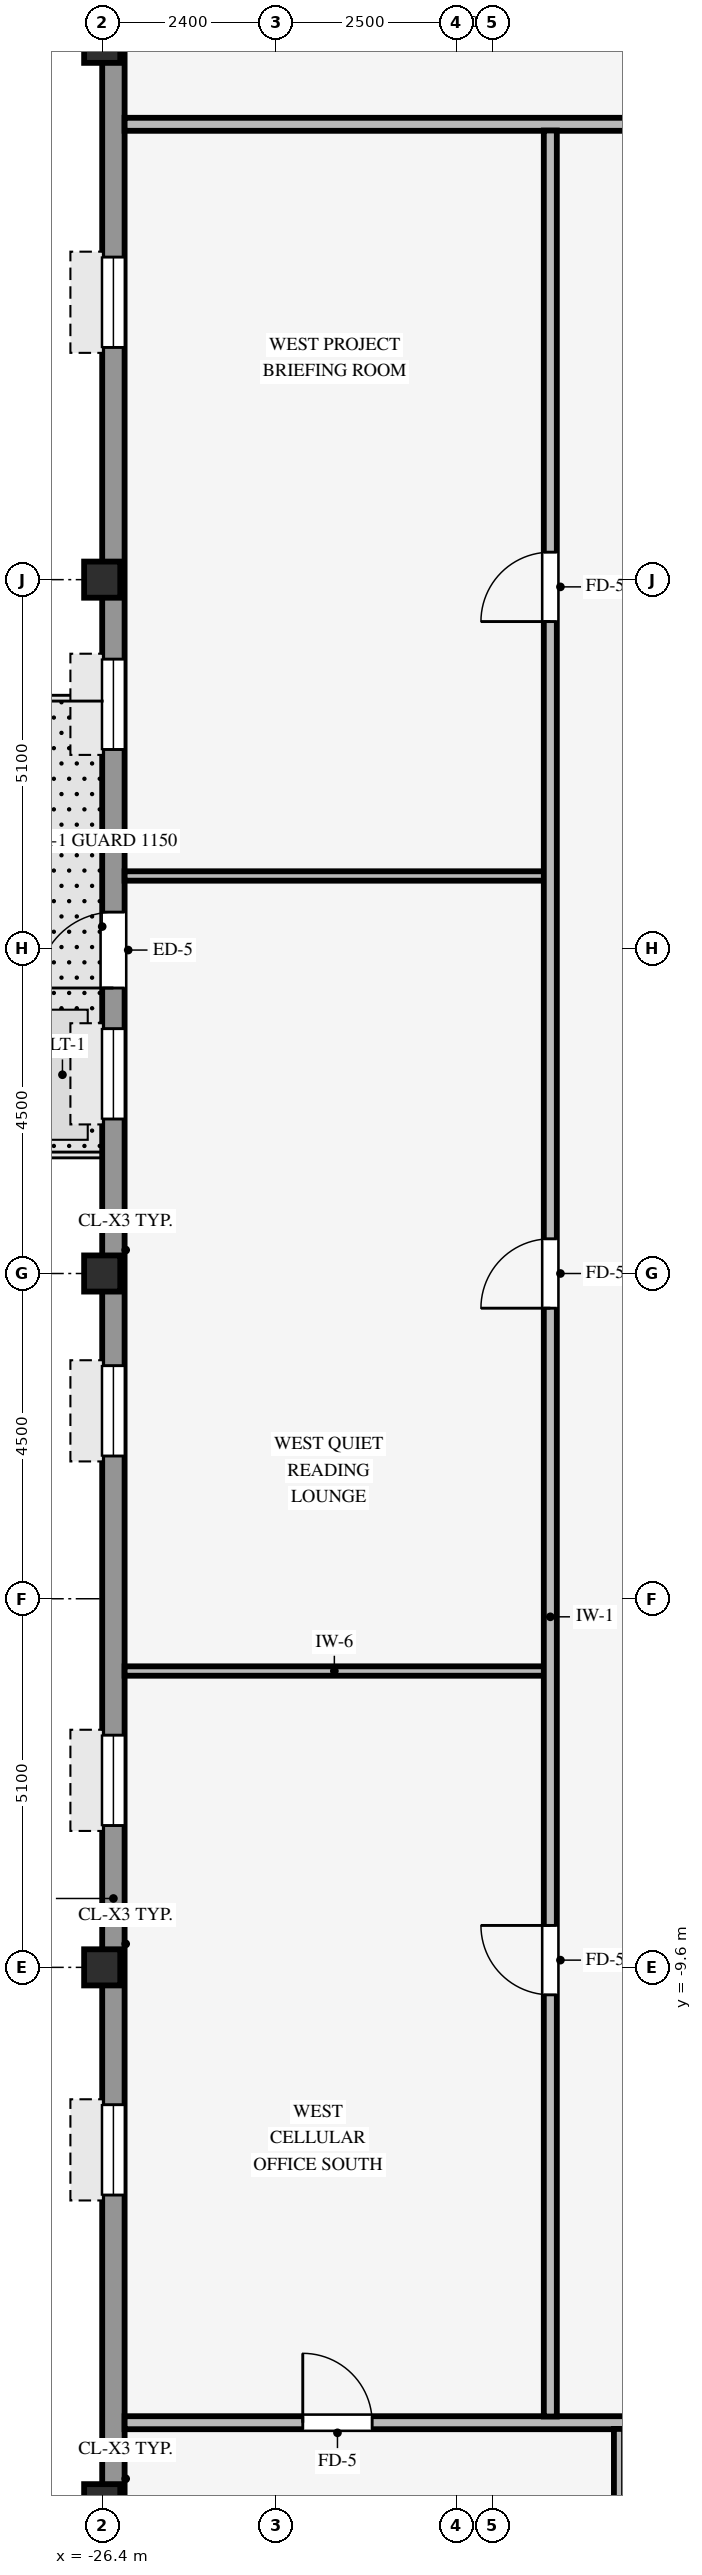
"""IFC4 building model, lengths in metres.
Left out: names, types, materials, properties, quantities, classifications, styles, units other than length and angle.
Written with IfcOpenShell. Run it as: python <this file> out.ifc"""

import sys

from ifc_helpers import new_model, si_unit, direction, frame, frame_2d, origin, origin_2d, place, context, subcontext, project, spatial, rectangle, hollow_rectangle, extrude, source, transform, mapped, element, fill, save


model = new_model("IFC4")
c1 = context("Model", 3, precision=1e-05, world=origin(), true_north=direction((0.0, 1.0)))
c2 = subcontext(c1, "Body", "Model", "MODEL_VIEW")
j1 = project(units=[si_unit("LENGTHUNIT", "METRE"), si_unit("PLANEANGLEUNIT", "RADIAN")], contexts=[c1])
p1 = place(None, origin())
s1 = spatial("IfcSite", under=j1, at=p1, CompositionType="ELEMENT")
p2 = place(p1, origin())
s2 = spatial("IfcBuilding", under=s1, at=p2, CompositionType="ELEMENT")
p3 = place(p2, frame((0.0, 0.0, 194.55)))
s3 = spatial("IfcBuildingStorey", under=s2, at=p3, CompositionType="ELEMENT", Elevation=194.55)
for number, where, z_axis, x_axis in (
    (1, (-26.4, -17.0, 0.0), (0.0, 0.0, 1.0), (1.0, 0.0, 0.0)),
    (2, (-26.4, -9.6, 0.0), (0.0, 0.0, 1.0), (1.0, 0.0, 0.0)),
    (3, (-26.4, 0.0, 0.0), (0.0, 0.0, 1.0), (1.0, 0.0, 0.0)),
    (4, (-26.4, 9.6, 0.0), (0.0, 0.0, 1.0), (1.0, 0.0, 0.0)),
    (5, (-26.4, 17.0, 0.0), (0.0, 0.0, 1.0), (1.0, 0.0, 0.0)),
):
    element("IfcColumn", number, at=place(p3, frame(where, z_axis=z_axis, x_axis=x_axis)), inside=s3, PredefinedType="COLUMN", context=c2, shape_type="SweptSolid", body=[
        extrude(hollow_rectangle(XDim=0.5, YDim=0.5, WallThickness=0.032, InnerFilletRadius=0.032, OuterFilletRadius=0.064, at=origin_2d()), origin(), (0.0, 0.0, 1.0), 3.37),
    ])
p4 = place(p3, frame((-26.245, -20.794, 0.0), z_axis=(0.0, 0.0, 1.0), x_axis=(0.0, 1.0, 0.0)))
e6 = element("IfcWall", 6, at=p4, inside=s3, PredefinedType="STANDARD", context=c2, shape_type="SweptSolid", body=[
    extrude(rectangle(XDim=37.788, YDim=0.31, at=frame_2d((18.894, 0.0))), origin(), (0.0, 0.0, 1.0), 2.705),
])
p5 = place(p4, frame((24.744, 0.0, 0.0)))
e7 = element("IfcOpeningElement", 7, at=p5, cuts=e6, PredefinedType="OPENING", context=c2, shape_type="SweptSolid", body=[
    extrude(rectangle(XDim=1.05, YDim=2.1, at=frame_2d((0.525, 1.05))), frame((0.0, 0.165, 0.0), z_axis=(0.0, -1.0, 0.0), x_axis=(1.0, 0.0, 0.0)), (0.0, 0.0, 1.0), 0.33),
])
p6 = place(p4, frame((1.581, 0.0, 0.8)))
e8 = element("IfcOpeningElement", 8, at=p6, cuts=e6, PredefinedType="OPENING", context=c2, shape_type="SweptSolid", body=[
    extrude(rectangle(XDim=1.25, YDim=1.52, at=frame_2d((0.625, 0.76))), frame((0.0, 0.165, 0.0), z_axis=(0.0, -1.0, 0.0), x_axis=(1.0, 0.0, 0.0)), (0.0, 0.0, 1.0), 0.33),
])
p7 = place(p4, frame((8.044, 0.0, 0.8)))
e9 = element("IfcOpeningElement", 9, at=p7, cuts=e6, PredefinedType="OPENING", context=c2, shape_type="SweptSolid", body=[
    extrude(rectangle(XDim=1.25, YDim=1.52, at=frame_2d((0.625, 0.76))), frame((0.0, 0.165, 0.0), z_axis=(0.0, -1.0, 0.0), x_axis=(1.0, 0.0, 0.0)), (0.0, 0.0, 1.0), 0.33),
])
p8 = place(p4, frame((13.156, 0.0, 0.8)))
e10 = element("IfcOpeningElement", 10, at=p8, cuts=e6, PredefinedType="OPENING", context=c2, shape_type="SweptSolid", body=[
    extrude(rectangle(XDim=1.25, YDim=1.52, at=frame_2d((0.625, 0.76))), frame((0.0, 0.165, 0.0), z_axis=(0.0, -1.0, 0.0), x_axis=(1.0, 0.0, 0.0)), (0.0, 0.0, 1.0), 0.33),
])
p9 = place(p4, frame((18.269, 0.0, 0.8)))
e11 = element("IfcOpeningElement", 11, at=p9, cuts=e6, PredefinedType="OPENING", context=c2, shape_type="SweptSolid", body=[
    extrude(rectangle(XDim=1.25, YDim=1.52, at=frame_2d((0.625, 0.76))), frame((0.0, 0.165, 0.0), z_axis=(0.0, -1.0, 0.0), x_axis=(1.0, 0.0, 0.0)), (0.0, 0.0, 1.0), 0.33),
])
p10 = place(p4, frame((22.932, 0.0, 0.8)))
e12 = element("IfcOpeningElement", 12, at=p10, cuts=e6, PredefinedType="OPENING", context=c2, shape_type="SweptSolid", body=[
    extrude(rectangle(XDim=1.25, YDim=1.52, at=frame_2d((0.625, 0.76))), frame((0.0, 0.165, 0.0), z_axis=(0.0, -1.0, 0.0), x_axis=(1.0, 0.0, 0.0)), (0.0, 0.0, 1.0), 0.33),
])
p11 = place(p4, frame((28.044, 0.0, 0.8)))
e13 = element("IfcOpeningElement", 13, at=p11, cuts=e6, PredefinedType="OPENING", context=c2, shape_type="SweptSolid", body=[
    extrude(rectangle(XDim=1.25, YDim=1.52, at=frame_2d((0.625, 0.76))), frame((0.0, 0.165, 0.0), z_axis=(0.0, -1.0, 0.0), x_axis=(1.0, 0.0, 0.0)), (0.0, 0.0, 1.0), 0.33),
])
p12 = place(p4, frame((33.607, 0.0, 0.8)))
e14 = element("IfcOpeningElement", 14, at=p12, cuts=e6, PredefinedType="OPENING", context=c2, shape_type="SweptSolid", body=[
    extrude(rectangle(XDim=1.25, YDim=1.52, at=frame_2d((0.625, 0.76))), frame((0.0, 0.165, 0.0), z_axis=(0.0, -1.0, 0.0), x_axis=(1.0, 0.0, 0.0)), (0.0, 0.0, 1.0), 0.33),
])
p13 = place(p3, frame((-26.09, -15.9, 0.0), z_axis=(0.0, 0.0, 1.0), x_axis=(1.0, 0.0, 0.0)))
e15 = element("IfcWall", 15, at=p13, inside=s3, PredefinedType="PARTITIONING", context=c2, shape_type="SweptSolid", body=[
    extrude(rectangle(XDim=48.38, YDim=0.18, at=frame_2d((24.19, 0.0))), origin(), (0.0, 0.0, 1.0), 3.36),
])
p14 = place(p13, frame((41.81, 0.0, 0.0)))
e16 = element("IfcOpeningElement", 16, at=p14, cuts=e15, PredefinedType="OPENING", context=c2, shape_type="SweptSolid", body=[
    extrude(rectangle(XDim=0.96, YDim=2.1, at=frame_2d((0.48, 1.05))), frame((0.0, 0.1, 0.0), z_axis=(0.0, -1.0, 0.0), x_axis=(1.0, 0.0, 0.0)), (0.0, 0.0, 1.0), 0.2),
])
p15 = place(p13, frame((17.985, 0.0, 0.0)))
e17 = element("IfcOpeningElement", 17, at=p15, cuts=e15, PredefinedType="OPENING", context=c2, shape_type="SweptSolid", body=[
    extrude(rectangle(XDim=0.96, YDim=2.1, at=frame_2d((0.48, 1.05))), frame((0.0, 0.1, 0.0), z_axis=(0.0, -1.0, 0.0), x_axis=(1.0, 0.0, 0.0)), (0.0, 0.0, 1.0), 0.2),
])
p16 = place(p13, frame((26.55, 0.0, 0.0)))
e18 = element("IfcOpeningElement", 18, at=p16, cuts=e15, PredefinedType="OPENING", context=c2, shape_type="SweptSolid", body=[
    extrude(rectangle(XDim=0.96, YDim=2.1, at=frame_2d((0.48, 1.05))), frame((0.0, 0.1, 0.0), z_axis=(0.0, -1.0, 0.0), x_axis=(1.0, 0.0, 0.0)), (0.0, 0.0, 1.0), 0.2),
])
p17 = place(p13, frame((10.935, 0.0, 0.0)))
e19 = element("IfcOpeningElement", 19, at=p17, cuts=e15, PredefinedType="OPENING", context=c2, shape_type="SweptSolid", body=[
    extrude(rectangle(XDim=0.96, YDim=2.1, at=frame_2d((0.48, 1.05))), frame((0.0, 0.1, 0.0), z_axis=(0.0, -1.0, 0.0), x_axis=(1.0, 0.0, 0.0)), (0.0, 0.0, 1.0), 0.2),
])
p18 = place(p13, frame((35.91, 0.0, 0.0)))
e20 = element("IfcOpeningElement", 20, at=p18, cuts=e15, PredefinedType="OPENING", context=c2, shape_type="SweptSolid", body=[
    extrude(rectangle(XDim=0.96, YDim=2.1, at=frame_2d((0.48, 1.05))), frame((0.0, 0.1, 0.0), z_axis=(0.0, -1.0, 0.0), x_axis=(1.0, 0.0, 0.0)), (0.0, 0.0, 1.0), 0.2),
])
p19 = place(p13, frame((2.465, 0.0, 0.0)))
e21 = element("IfcOpeningElement", 21, at=p19, cuts=e15, PredefinedType="OPENING", context=c2, shape_type="SweptSolid", body=[
    extrude(rectangle(XDim=0.96, YDim=2.1, at=frame_2d((0.48, 1.05))), frame((0.0, 0.1, 0.0), z_axis=(0.0, -1.0, 0.0), x_axis=(1.0, 0.0, 0.0)), (0.0, 0.0, 1.0), 0.2),
])
for number, where, z_axis, x_axis in (
    (22, (-26.09, -5.5, 0.0), (0.0, 0.0, 1.0), (1.0, 0.0, 0.0)),
    (23, (-26.09, 5.5, 0.0), (0.0, 0.0, 1.0), (1.0, 0.0, 0.0)),
):
    element("IfcWall", number, at=place(p3, frame(where, z_axis=z_axis, x_axis=x_axis)), inside=s3, PredefinedType="PARTITIONING", context=c2, shape_type="SweptSolid", body=[
        extrude(rectangle(XDim=5.804, YDim=0.13, at=frame_2d((2.902, 0.0))), origin(), (0.0, 0.0, 1.0), 3.36),
    ])
p20 = place(p3, frame((-26.09, 15.9, 0.0), z_axis=(0.0, 0.0, 1.0), x_axis=(1.0, 0.0, 0.0)))
e24 = element("IfcWall", 24, at=p20, inside=s3, PredefinedType="PARTITIONING", context=c2, shape_type="SweptSolid", body=[
    extrude(rectangle(XDim=48.38, YDim=0.18, at=frame_2d((24.19, 0.0))), origin(), (0.0, 0.0, 1.0), 3.36),
])
p21 = place(p20, frame((14.29, 0.0, 0.0)))
e25 = element("IfcOpeningElement", 25, at=p21, cuts=e24, PredefinedType="OPENING", context=c2, shape_type="SweptSolid", body=[
    extrude(rectangle(XDim=0.96, YDim=2.1, at=frame_2d((0.48, 1.05))), frame((0.0, 0.1, 0.0), z_axis=(0.0, -1.0, 0.0), x_axis=(1.0, 0.0, 0.0)), (0.0, 0.0, 1.0), 0.2),
])
p22 = place(p20, frame((40.51, 0.0, 0.0)))
e26 = element("IfcOpeningElement", 26, at=p22, cuts=e24, PredefinedType="OPENING", context=c2, shape_type="SweptSolid", body=[
    extrude(rectangle(XDim=0.96, YDim=2.1, at=frame_2d((0.48, 1.05))), frame((0.0, 0.1, 0.0), z_axis=(0.0, -1.0, 0.0), x_axis=(1.0, 0.0, 0.0)), (0.0, 0.0, 1.0), 0.2),
])
p23 = place(p3, frame((-20.2, -15.814, 0.0), z_axis=(0.0, 0.0, 1.0), x_axis=(0.0, 1.0, 0.0)))
e27 = element("IfcWall", 27, at=p23, inside=s3, PredefinedType="PARTITIONING", context=c2, shape_type="SweptSolid", body=[
    extrude(rectangle(XDim=31.628, YDim=0.18, at=frame_2d((15.814, 0.0))), origin(), (0.0, 0.0, 1.0), 3.36),
])
p24 = place(p23, frame((15.334, 0.0, 0.0)))
e28 = element("IfcOpeningElement", 28, at=p24, cuts=e27, PredefinedType="OPENING", context=c2, shape_type="SweptSolid", body=[
    extrude(rectangle(XDim=0.96, YDim=2.1, at=frame_2d((0.48, 1.05))), frame((0.0, 0.1, 0.0), z_axis=(0.0, -1.0, 0.0), x_axis=(1.0, 0.0, 0.0)), (0.0, 0.0, 1.0), 0.2),
])
p25 = place(p23, frame((5.834, 0.0, 0.0)))
e29 = element("IfcOpeningElement", 29, at=p25, cuts=e27, PredefinedType="OPENING", context=c2, shape_type="SweptSolid", body=[
    extrude(rectangle(XDim=0.96, YDim=2.1, at=frame_2d((0.48, 1.05))), frame((0.0, 0.1, 0.0), z_axis=(0.0, -1.0, 0.0), x_axis=(1.0, 0.0, 0.0)), (0.0, 0.0, 1.0), 0.2),
])
p26 = place(p23, frame((24.834, 0.0, 0.0)))
e30 = element("IfcOpeningElement", 30, at=p26, cuts=e27, PredefinedType="OPENING", context=c2, shape_type="SweptSolid", body=[
    extrude(rectangle(XDim=0.96, YDim=2.1, at=frame_2d((0.48, 1.05))), frame((0.0, 0.1, 0.0), z_axis=(0.0, -1.0, 0.0), x_axis=(1.0, 0.0, 0.0)), (0.0, 0.0, 1.0), 0.2),
])
p27 = place(p3, frame((-19.25, -22.89, 0.0), z_axis=(0.0, 0.0, 1.0), x_axis=(0.0, 1.0, 0.0)))
e31 = element("IfcWall", 31, at=p27, inside=s3, PredefinedType="PARTITIONING", context=c2, shape_type="SweptSolid", body=[
    extrude(rectangle(XDim=6.904, YDim=0.14, at=frame_2d((3.452, 0.0))), origin(), (0.0, 0.0, 1.0), 3.36),
])
m1 = source(origin(), c2, "Body", "SweptSolid", [
    extrude(rectangle(XDim=1.05, YDim=2.1, at=frame_2d((0.525, 1.05))), frame((0.0, 0.025, 0.0), z_axis=(0.0, -1.0, 0.0), x_axis=(1.0, 0.0, 0.0)), (0.0, 0.0, 1.0), 0.05),
])
p28 = place(p5, origin())
e32 = element("IfcDoor", 32, at=p28, inside=s3, OperationType="SINGLE_SWING_LEFT", PredefinedType="DOOR", context=c2, shape_type="MappedRepresentation", body=[
    mapped(m1, transform((0.0, 0.0, 0.0), scale=1.0)),
])
fill(e7, e32)
m2 = source(origin(), c2, "Body", "SweptSolid", [
    extrude(rectangle(XDim=1.25, YDim=1.52, at=frame_2d((0.625, 0.76))), frame((0.0, 0.03, 0.0), z_axis=(0.0, -1.0, 0.0), x_axis=(1.0, 0.0, 0.0)), (0.0, 0.0, 1.0), 0.06),
])
p29 = place(p7, origin())
e33 = element("IfcWindow", 33, at=p29, inside=s3, PartitioningType="SINGLE_PANEL", PredefinedType="WINDOW", context=c2, shape_type="MappedRepresentation", body=[
    mapped(m2, transform((0.0, 0.0, 0.0), scale=1.0)),
])
fill(e9, e33)
p30 = place(p8, origin())
e34 = element("IfcWindow", 34, at=p30, inside=s3, PartitioningType="SINGLE_PANEL", PredefinedType="WINDOW", context=c2, shape_type="MappedRepresentation", body=[
    mapped(m2, transform((0.0, 0.0, 0.0), scale=1.0)),
])
fill(e10, e34)
p31 = place(p9, origin())
e35 = element("IfcWindow", 35, at=p31, inside=s3, PartitioningType="SINGLE_PANEL", PredefinedType="WINDOW", context=c2, shape_type="MappedRepresentation", body=[
    mapped(m2, transform((0.0, 0.0, 0.0), scale=1.0)),
])
fill(e11, e35)
p32 = place(p10, origin())
e36 = element("IfcWindow", 36, at=p32, inside=s3, PartitioningType="SINGLE_PANEL", PredefinedType="WINDOW", context=c2, shape_type="MappedRepresentation", body=[
    mapped(m2, transform((0.0, 0.0, 0.0), scale=1.0)),
])
fill(e12, e36)
p33 = place(p11, origin())
e37 = element("IfcWindow", 37, at=p33, inside=s3, PartitioningType="SINGLE_PANEL", PredefinedType="WINDOW", context=c2, shape_type="MappedRepresentation", body=[
    mapped(m2, transform((0.0, 0.0, 0.0), scale=1.0)),
])
fill(e13, e37)
p34 = place(p12, origin())
e38 = element("IfcWindow", 38, at=p34, inside=s3, PartitioningType="SINGLE_PANEL", PredefinedType="WINDOW", context=c2, shape_type="MappedRepresentation", body=[
    mapped(m2, transform((0.0, 0.0, 0.0), scale=1.0)),
])
fill(e14, e38)
m3 = source(origin(), c2, "Body", "SweptSolid", [
    extrude(rectangle(XDim=0.96, YDim=2.1, at=frame_2d((0.48, 1.05))), frame((0.0, 0.025, 0.0), z_axis=(0.0, -1.0, 0.0), x_axis=(1.0, 0.0, 0.0)), (0.0, 0.0, 1.0), 0.05),
])
p35 = place(p24, origin())
e39 = element("IfcDoor", 39, at=p35, inside=s3, OperationType="SINGLE_SWING_LEFT", PredefinedType="DOOR", context=c2, shape_type="MappedRepresentation", body=[
    mapped(m3, transform((0.0, 0.0, 0.0), scale=1.0)),
])
fill(e28, e39)
p36 = place(p25, origin())
e40 = element("IfcDoor", 40, at=p36, inside=s3, OperationType="SINGLE_SWING_RIGHT", PredefinedType="DOOR", context=c2, shape_type="MappedRepresentation", body=[
    mapped(m3, transform((0.0, 0.0, 0.0), scale=1.0)),
])
fill(e29, e40)
p37 = place(p26, origin())
e41 = element("IfcDoor", 41, at=p37, inside=s3, OperationType="SINGLE_SWING_LEFT", PredefinedType="DOOR", context=c2, shape_type="MappedRepresentation", body=[
    mapped(m3, transform((0.0, 0.0, 0.0), scale=1.0)),
])
fill(e30, e41)
p38 = place(p19, origin())
e42 = element("IfcDoor", 42, at=p38, inside=s3, OperationType="SINGLE_SWING_LEFT", PredefinedType="DOOR", context=c2, shape_type="MappedRepresentation", body=[
    mapped(m3, transform((0.0, 0.0, 0.0), scale=1.0)),
])
fill(e21, e42)
save(model, sys.argv[1])
